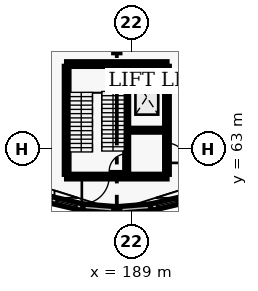
"""IFC4 building model, lengths in metres.
Left out: names, types, materials, properties, quantities, classifications, styles, units other than length and angle.
Written with IfcOpenShell. Run it as: python <this file> out.ifc"""

import sys

from ifc_helpers import new_model, si_unit, direction, frame, frame_2d, origin, origin_2d, place, context, subcontext, project, spatial, rectangle, i_section, extrude, element, fill, save


model = new_model("IFC4")
c1 = context("Model", 3, precision=1e-05, world=origin(), true_north=direction((0.0, 1.0)))
c2 = subcontext(c1, "Body", "Model", "MODEL_VIEW")
j1 = project(units=[si_unit("LENGTHUNIT", "METRE"), si_unit("PLANEANGLEUNIT", "RADIAN")], contexts=[c1])
p1 = place(None, origin())
s1 = spatial("IfcSite", under=j1, at=p1, CompositionType="ELEMENT")
p2 = place(p1, origin())
s2 = spatial("IfcBuilding", under=s1, at=p2, CompositionType="ELEMENT")
p3 = place(p2, origin())
s3 = spatial("IfcBuildingStorey", under=s2, at=p3, CompositionType="ELEMENT", Elevation=0.0)
for number, where, z_axis, x_axis in (
    (1, (188.0, 69.5, 0.0), (0.0, 0.0, 1.0), (0.0, -1.0, 0.0)),
    (2, (188.0, 59.0, 0.0), (0.0, 0.0, 1.0), (0.0, -1.0, 0.0)),
):
    element("IfcColumn", number, at=place(p3, frame(where, z_axis=z_axis, x_axis=x_axis)), inside=s3, PredefinedType="COLUMN", context=c2, shape_type="SweptSolid", body=[
        extrude(i_section(OverallWidth=0.3, OverallDepth=0.4, WebThickness=0.013, FlangeThickness=0.024, FilletRadius=0.027, at=origin_2d()), origin(), (0.0, 0.0, 1.0), 5.4),
    ])
p4 = place(p3, frame((183.61, 59.682, 0.0), z_axis=(0.0, 0.0, 1.0), x_axis=(0.973572460089, -0.228378337317, 0.0)))
e3 = element("IfcWall", 3, at=p4, inside=s3, PredefinedType="SOLIDWALL", context=c2, shape_type="SweptSolid", body=[
    extrude(rectangle(XDim=2.224, YDim=0.44, at=frame_2d((1.112, 0.0))), origin(), (0.0, 0.0, 1.0), 4.7),
])
p5 = place(p4, frame((0.437, 0.0, 0.95)))
e4 = element("IfcOpeningElement", 4, at=p5, cuts=e3, PredefinedType="OPENING", context=c2, shape_type="SweptSolid", body=[
    extrude(rectangle(XDim=1.35, YDim=1.5, at=frame_2d((0.675, 0.75))), frame((0.0, 0.23, 0.0), z_axis=(0.0, -1.0, 0.0), x_axis=(1.0, 0.0, 0.0)), (0.0, 0.0, 1.0), 0.46),
])
for number, where, z_axis, x_axis in (
    (5, (185.775, 59.174, 0.0), (0.0, 0.0, 1.0), (0.997, -0.079, 0.0)),
    (6, (188.039, 59.0, 0.0), (0.0, 0.0, 1.0), (0.997, 0.079, 0.0)),
):
    element("IfcWall", number, at=place(p3, frame(where, z_axis=z_axis, x_axis=x_axis)), inside=s3, PredefinedType="SOLIDWALL", context=c2, shape_type="SweptSolid", body=[
        extrude(rectangle(XDim=2.193, YDim=0.44, at=frame_2d((1.096, 0.0))), origin(), (0.0, 0.0, 1.0), 4.7),
    ])
p6 = place(p3, frame((190.225, 59.174, 0.0), z_axis=(0.0, 0.0, 1.0), x_axis=(0.973572460089, 0.228378337317, 0.0)))
e7 = element("IfcWall", 7, at=p6, inside=s3, PredefinedType="SOLIDWALL", context=c2, shape_type="SweptSolid", body=[
    extrude(rectangle(XDim=2.224, YDim=0.44, at=frame_2d((1.112, 0.0))), origin(), (0.0, 0.0, 1.0), 4.7),
])
p7 = place(p6, frame((0.437, 0.0, 0.95)))
e8 = element("IfcOpeningElement", 8, at=p7, cuts=e7, PredefinedType="OPENING", context=c2, shape_type="SweptSolid", body=[
    extrude(rectangle(XDim=1.35, YDim=1.5, at=frame_2d((0.675, 0.75))), frame((0.0, 0.23, 0.0), z_axis=(0.0, -1.0, 0.0), x_axis=(1.0, 0.0, 0.0)), (0.0, 0.0, 1.0), 0.46),
])
p8 = place(p3, frame((184.7, 61.2, 0.0), z_axis=(0.0, 0.0, 1.0), x_axis=(1.0, 0.0, 0.0)))
e9 = element("IfcWall", 9, at=p8, inside=s3, PredefinedType="SHEAR", context=c2, shape_type="SweptSolid", body=[
    extrude(rectangle(XDim=6.6, YDim=0.3, at=frame_2d((3.3, 0.0))), origin(), (0.0, 0.0, 1.0), 5.4),
])
p9 = place(p8, frame((1.0, 0.0, 0.0)))
e10 = element("IfcOpeningElement", 10, at=p9, cuts=e9, PredefinedType="OPENING", context=c2, shape_type="SweptSolid", body=[
    extrude(rectangle(XDim=1.8, YDim=2.15, at=frame_2d((0.9, 1.075))), frame((0.0, 0.16, 0.0), z_axis=(0.0, -1.0, 0.0), x_axis=(1.0, 0.0, 0.0)), (0.0, 0.0, 1.0), 0.32),
])
p10 = place(p3, frame((184.7, 68.6, 0.0), z_axis=(0.0, 0.0, 1.0), x_axis=(1.0, 0.0, 0.0)))
e11 = element("IfcWall", 11, at=p10, inside=s3, PredefinedType="SHEAR", context=c2, shape_type="SweptSolid", body=[
    extrude(rectangle(XDim=6.6, YDim=0.3, at=frame_2d((3.3, 0.0))), origin(), (0.0, 0.0, 1.0), 5.4),
])
p11 = place(p3, frame((184.7, 61.35, 0.0), z_axis=(0.0, 0.0, 1.0), x_axis=(0.0, 1.0, 0.0)))
e12 = element("IfcWall", 12, at=p11, inside=s3, PredefinedType="SHEAR", context=c2, shape_type="SweptSolid", body=[
    extrude(rectangle(XDim=7.1, YDim=0.3, at=frame_2d((3.55, 0.0))), origin(), (0.0, 0.0, 1.0), 5.4),
])
p12 = place(p3, frame((191.3, 61.35, 0.0), z_axis=(0.0, 0.0, 1.0), x_axis=(0.0, 1.0, 0.0)))
e13 = element("IfcWall", 13, at=p12, inside=s3, PredefinedType="SHEAR", context=c2, shape_type="SweptSolid", body=[
    extrude(rectangle(XDim=7.1, YDim=0.3, at=frame_2d((3.55, 0.0))), origin(), (0.0, 0.0, 1.0), 5.4),
])
p13 = place(p12, frame((0.75, 0.0, 0.0)))
e14 = element("IfcOpeningElement", 14, at=p13, cuts=e13, PredefinedType="OPENING", context=c2, shape_type="SweptSolid", body=[
    extrude(rectangle(XDim=1.3, YDim=2.15, at=frame_2d((0.65, 1.075))), frame((0.0, 0.16, 0.0), z_axis=(0.0, -1.0, 0.0), x_axis=(1.0, 0.0, 0.0)), (0.0, 0.0, 1.0), 0.32),
])
p14 = place(p3, frame((188.65, 61.35, 0.0), z_axis=(0.0, 0.0, 1.0), x_axis=(0.0, 1.0, 0.0)))
e15 = element("IfcWall", 15, at=p14, inside=s3, PredefinedType="SHEAR", context=c2, shape_type="SweptSolid", body=[
    extrude(rectangle(XDim=7.1, YDim=0.25, at=frame_2d((3.55, 0.0))), origin(), (0.0, 0.0, 1.0), 5.4),
])
p15 = place(p14, frame((0.2, 0.0, 0.0)))
e16 = element("IfcOpeningElement", 16, at=p15, cuts=e15, PredefinedType="OPENING", context=c2, shape_type="SweptSolid", body=[
    extrude(rectangle(XDim=1.15, YDim=2.15, at=frame_2d((0.575, 1.075))), frame((0.0, 0.135, 0.0), z_axis=(0.0, -1.0, 0.0), x_axis=(1.0, 0.0, 0.0)), (0.0, 0.0, 1.0), 0.27),
])
p16 = place(p3, frame((188.77, 64.25, 0.0), z_axis=(0.0, 0.0, 1.0), x_axis=(1.0, 0.0, 0.0)))
e17 = element("IfcWall", 17, at=p16, inside=s3, PredefinedType="SHEAR", context=c2, shape_type="SweptSolid", body=[
    extrude(rectangle(XDim=2.38, YDim=0.25, at=frame_2d((1.19, 0.0))), origin(), (0.0, 0.0, 1.0), 5.4),
])
p17 = place(p16, frame((0.64, 0.0, 0.0)))
e18 = element("IfcOpeningElement", 18, at=p17, cuts=e17, PredefinedType="OPENING", context=c2, shape_type="SweptSolid", body=[
    extrude(rectangle(XDim=1.1, YDim=2.15, at=frame_2d((0.55, 1.075))), frame((0.0, 0.135, 0.0), z_axis=(0.0, -1.0, 0.0), x_axis=(1.0, 0.0, 0.0)), (0.0, 0.0, 1.0), 0.27),
])
p18 = place(p5, origin())
e19 = element("IfcWindow", 19, at=p18, inside=s3, PartitioningType="SINGLE_PANEL", PredefinedType="WINDOW", context=c2, shape_type="SweptSolid", body=[
    extrude(rectangle(XDim=1.35, YDim=1.5, at=frame_2d((0.675, 0.75))), frame((0.0, 0.03, 0.0), z_axis=(0.0, -1.0, 0.0), x_axis=(1.0, 0.0, 0.0)), (0.0, 0.0, 1.0), 0.06),
])
fill(e4, e19)
p19 = place(p7, origin())
e20 = element("IfcWindow", 20, at=p19, inside=s3, PartitioningType="SINGLE_PANEL", PredefinedType="WINDOW", context=c2, shape_type="SweptSolid", body=[
    extrude(rectangle(XDim=1.35, YDim=1.5, at=frame_2d((0.675, 0.75))), frame((0.0, 0.03, 0.0), z_axis=(0.0, -1.0, 0.0), x_axis=(1.0, 0.0, 0.0)), (0.0, 0.0, 1.0), 0.06),
])
fill(e8, e20)
p20 = place(p13, frame((1.3, 0.0, 0.0), z_axis=(0.0, 0.0, 1.0), x_axis=(-1.0, 0.0, 0.0)))
e21 = element("IfcDoor", 21, at=p20, inside=s3, OperationType="DOUBLE_DOOR_SINGLE_SWING", PredefinedType="DOOR", context=c2, shape_type="SweptSolid", body=[
    extrude(rectangle(XDim=1.3, YDim=2.15, at=frame_2d((0.65, 1.075))), frame((0.0, 0.025, 0.0), z_axis=(0.0, -1.0, 0.0), x_axis=(1.0, 0.0, 0.0)), (0.0, 0.0, 1.0), 0.05),
])
fill(e14, e21)
p21 = place(p15, origin())
e22 = element("IfcDoor", 22, at=p21, inside=s3, OperationType="SINGLE_SWING_LEFT", PredefinedType="DOOR", context=c2, shape_type="SweptSolid", body=[
    extrude(rectangle(XDim=1.15, YDim=2.15, at=frame_2d((0.575, 1.075))), frame((0.0, 0.025, 0.0), z_axis=(0.0, -1.0, 0.0), x_axis=(1.0, 0.0, 0.0)), (0.0, 0.0, 1.0), 0.05),
])
fill(e16, e22)
p22 = place(p9, frame((1.8, 0.0, 0.0), z_axis=(0.0, 0.0, 1.0), x_axis=(-1.0, 0.0, 0.0)))
e23 = element("IfcDoor", 23, at=p22, inside=s3, OperationType="DOUBLE_DOOR_SINGLE_SWING", PredefinedType="DOOR", context=c2, shape_type="SweptSolid", body=[
    extrude(rectangle(XDim=1.8, YDim=2.15, at=frame_2d((0.9, 1.075))), frame((0.0, 0.025, 0.0), z_axis=(0.0, -1.0, 0.0), x_axis=(1.0, 0.0, 0.0)), (0.0, 0.0, 1.0), 0.05),
])
fill(e10, e23)
p23 = place(p17, origin())
e24 = element("IfcDoor", 24, at=p23, inside=s3, OperationType="SLIDING_TO_LEFT", PredefinedType="DOOR", context=c2, shape_type="SweptSolid", body=[
    extrude(rectangle(XDim=1.1, YDim=2.15, at=frame_2d((0.55, 1.075))), frame((0.0, 0.025, 0.0), z_axis=(0.0, -1.0, 0.0), x_axis=(1.0, 0.0, 0.0)), (0.0, 0.0, 1.0), 0.05),
])
fill(e18, e24)
save(model, sys.argv[1])
